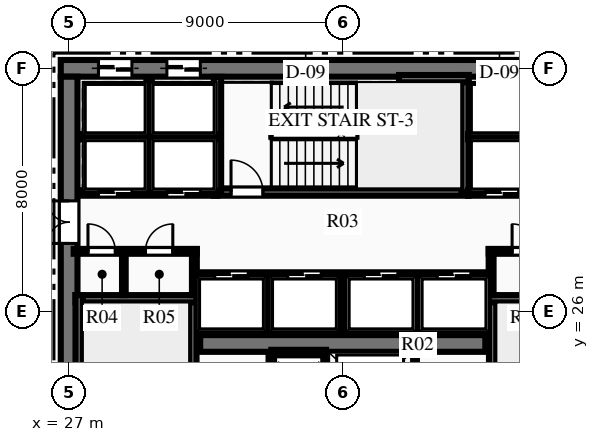
"""IFC4 building model, lengths in metres.
Left out: names, types, materials, properties, quantities, classifications, styles, units other than length and angle.
Written with IfcOpenShell. Run it as: python <this file> out.ifc"""

import sys

from ifc_helpers import new_model, si_unit, direction, frame, frame_2d, origin, place, context, subcontext, project, spatial, rectangle, extrude, element, fill, save


model = new_model("IFC4")
c1 = context("Model", 3, precision=1e-05, world=origin(), true_north=direction((0.0, 1.0)))
c2 = subcontext(c1, "Body", "Model", "MODEL_VIEW")
j1 = project(units=[si_unit("LENGTHUNIT", "METRE"), si_unit("PLANEANGLEUNIT", "RADIAN")], contexts=[c1])
p1 = place(None, origin())
s1 = spatial("IfcSite", under=j1, at=p1, CompositionType="ELEMENT")
p2 = place(p1, origin())
s2 = spatial("IfcBuilding", under=s1, at=p2, CompositionType="ELEMENT")
p3 = place(p2, frame((0.0, 0.0, 90.45)))
s3 = spatial("IfcBuildingStorey", under=s2, at=p3, CompositionType="ELEMENT", Elevation=90.45)
p4 = place(p3, frame((26.725, 34.0, 0.0), z_axis=(0.0, 0.0, 1.0), x_axis=(1.0, 0.0, 0.0)))
e1 = element("IfcWall", 1, at=p4, inside=s3, PredefinedType="SHEAR", context=c2, shape_type="SweptSolid", body=[
    extrude(rectangle(XDim=18.55, YDim=0.55, at=frame_2d((9.275, 0.0))), origin(), (0.0, 0.0, 1.0), 3.75),
])
p5 = place(p4, frame((1.24, 0.0, 0.0)))
e2 = element("IfcOpeningElement", 2, at=p5, cuts=e1, PredefinedType="OPENING", context=c2, shape_type="SweptSolid", body=[
    extrude(rectangle(XDim=1.1, YDim=2.15, at=frame_2d((0.55, 1.075))), frame((0.0, 0.285, 0.0), z_axis=(0.0, -1.0, 0.0), x_axis=(1.0, 0.0, 0.0)), (0.0, 0.0, 1.0), 0.57),
])
p6 = place(p4, frame((3.49, 0.0, 0.0)))
e3 = element("IfcOpeningElement", 3, at=p6, cuts=e1, PredefinedType="OPENING", context=c2, shape_type="SweptSolid", body=[
    extrude(rectangle(XDim=1.1, YDim=2.15, at=frame_2d((0.55, 1.075))), frame((0.0, 0.285, 0.0), z_axis=(0.0, -1.0, 0.0), x_axis=(1.0, 0.0, 0.0)), (0.0, 0.0, 1.0), 0.57),
])
p7 = place(p4, frame((13.96, 0.0, 0.0)))
e4 = element("IfcOpeningElement", 4, at=p7, cuts=e1, PredefinedType="OPENING", context=c2, shape_type="SweptSolid", body=[
    extrude(rectangle(XDim=1.1, YDim=2.15, at=frame_2d((0.55, 1.075))), frame((0.0, 0.285, 0.0), z_axis=(0.0, -1.0, 0.0), x_axis=(1.0, 0.0, 0.0)), (0.0, 0.0, 1.0), 0.57),
])
p8 = place(p4, frame((16.21, 0.0, 0.0)))
e5 = element("IfcOpeningElement", 5, at=p8, cuts=e1, PredefinedType="OPENING", context=c2, shape_type="SweptSolid", body=[
    extrude(rectangle(XDim=1.1, YDim=2.15, at=frame_2d((0.55, 1.075))), frame((0.0, 0.285, 0.0), z_axis=(0.0, -1.0, 0.0), x_axis=(1.0, 0.0, 0.0)), (0.0, 0.0, 1.0), 0.57),
])
p9 = place(p3, frame((27.0, 18.275, 0.0), z_axis=(0.0, 0.0, 1.0), x_axis=(0.0, 1.0, 0.0)))
e6 = element("IfcWall", 6, at=p9, inside=s3, PredefinedType="SHEAR", context=c2, shape_type="SweptSolid", body=[
    extrude(rectangle(XDim=15.45, YDim=0.55, at=frame_2d((7.725, 0.0))), origin(), (0.0, 0.0, 1.0), 3.75),
])
p10 = place(p9, frame((9.965, 0.0, 0.0)))
e7 = element("IfcOpeningElement", 7, at=p10, cuts=e6, PredefinedType="OPENING", context=c2, shape_type="SweptSolid", body=[
    extrude(rectangle(XDim=1.4, YDim=2.2, at=frame_2d((0.7, 1.1))), frame((0.0, 0.285, 0.0), z_axis=(0.0, -1.0, 0.0), x_axis=(1.0, 0.0, 0.0)), (0.0, 0.0, 1.0), 0.57),
])
p11 = place(p3, frame((31.31, 24.95, 0.0), z_axis=(0.0, 0.0, 1.0), x_axis=(1.0, 0.0, 0.0)))
e8 = element("IfcWall", 8, at=p11, inside=s3, PredefinedType="SHEAR", context=c2, shape_type="SweptSolid", body=[
    extrude(rectangle(XDim=9.38, YDim=0.55, at=frame_2d((4.69, 0.0))), origin(), (0.0, 0.0, 1.0), 3.75),
])
p12 = place(p3, frame((31.07, 18.28, 0.0), z_axis=(0.0, 0.0, 1.0), x_axis=(0.0, 1.0, 0.0)))
e9 = element("IfcWall", 9, at=p12, inside=s3, PredefinedType="SHEAR", context=c2, shape_type="SweptSolid", body=[
    extrude(rectangle(XDim=8.26, YDim=0.24, at=frame_2d((4.13, 0.0))), origin(), (0.0, 0.0, 1.0), 3.75),
])
p13 = place(p12, frame((0.365, 0.0, 0.0)))
e10 = element("IfcOpeningElement", 10, at=p13, cuts=e9, PredefinedType="OPENING", context=c2, shape_type="SweptSolid", body=[
    extrude(rectangle(XDim=1.05, YDim=2.15, at=frame_2d((0.525, 1.075))), frame((0.0, 0.13, 0.0), z_axis=(0.0, -1.0, 0.0), x_axis=(1.0, 0.0, 0.0)), (0.0, 0.0, 1.0), 0.26),
])
p14 = place(p3, frame((27.21, 26.42, 0.0), z_axis=(0.0, 0.0, 1.0), x_axis=(1.0, 0.0, 0.0)))
e11 = element("IfcWall", 11, at=p14, inside=s3, PredefinedType="SHEAR", context=c2, shape_type="SweptSolid", body=[
    extrude(rectangle(XDim=3.98, YDim=0.24, at=frame_2d((1.99, 0.0))), origin(), (0.0, 0.0, 1.0), 3.75),
])
p15 = place(p3, frame((27.33, 18.28, 0.0), z_axis=(0.0, 0.0, 1.0), x_axis=(0.0, 1.0, 0.0)))
e12 = element("IfcWall", 12, at=p15, inside=s3, PredefinedType="SHEAR", context=c2, shape_type="SweptSolid", body=[
    extrude(rectangle(XDim=8.26, YDim=0.24, at=frame_2d((4.13, 0.0))), origin(), (0.0, 0.0, 1.0), 3.75),
])
p16 = place(p3, frame((40.93, 18.28, 0.0), z_axis=(0.0, 0.0, 1.0), x_axis=(0.0, 1.0, 0.0)))
e13 = element("IfcWall", 13, at=p16, inside=s3, PredefinedType="SHEAR", context=c2, shape_type="SweptSolid", body=[
    extrude(rectangle(XDim=8.26, YDim=0.24, at=frame_2d((4.13, 0.0))), origin(), (0.0, 0.0, 1.0), 3.75),
])
p17 = place(p16, frame((0.365, 0.0, 0.0)))
e14 = element("IfcOpeningElement", 14, at=p17, cuts=e13, PredefinedType="OPENING", context=c2, shape_type="SweptSolid", body=[
    extrude(rectangle(XDim=1.05, YDim=2.15, at=frame_2d((0.525, 1.075))), frame((0.0, 0.13, 0.0), z_axis=(0.0, -1.0, 0.0), x_axis=(1.0, 0.0, 0.0)), (0.0, 0.0, 1.0), 0.26),
])
p18 = place(p3, frame((40.81, 26.42, 0.0), z_axis=(0.0, 0.0, 1.0), x_axis=(1.0, 0.0, 0.0)))
e15 = element("IfcWall", 15, at=p18, inside=s3, PredefinedType="SHEAR", context=c2, shape_type="SweptSolid", body=[
    extrude(rectangle(XDim=3.98, YDim=0.24, at=frame_2d((1.99, 0.0))), origin(), (0.0, 0.0, 1.0), 3.75),
])
p19 = place(p3, frame((31.76, 29.93, 0.0), z_axis=(0.0, 0.0, 1.0), x_axis=(1.0, 0.0, 0.0)))
e16 = element("IfcWall", 16, at=p19, inside=s3, PredefinedType="SHEAR", context=c2, shape_type="SweptSolid", body=[
    extrude(rectangle(XDim=8.38, YDim=0.24, at=frame_2d((4.19, 0.0))), origin(), (0.0, 0.0, 1.0), 3.75),
])
p20 = place(p19, frame((0.565, 0.0, 0.0)))
e17 = element("IfcOpeningElement", 17, at=p20, cuts=e16, PredefinedType="OPENING", context=c2, shape_type="SweptSolid", body=[
    extrude(rectangle(XDim=1.05, YDim=2.15, at=frame_2d((0.525, 1.075))), frame((0.0, 0.13, 0.0), z_axis=(0.0, -1.0, 0.0), x_axis=(1.0, 0.0, 0.0)), (0.0, 0.0, 1.0), 0.26),
])
p21 = place(p3, frame((31.88, 29.93, 0.0), z_axis=(0.0, 0.0, 1.0), x_axis=(0.0, 1.0, 0.0)))
e18 = element("IfcWall", 18, at=p21, inside=s3, PredefinedType="SHEAR", context=c2, shape_type="SweptSolid", body=[
    extrude(rectangle(XDim=3.79, YDim=0.24, at=frame_2d((1.895, 0.0))), origin(), (0.0, 0.0, 1.0), 3.75),
])
p22 = place(p3, frame((40.02, 29.93, 0.0), z_axis=(0.0, 0.0, 1.0), x_axis=(0.0, 1.0, 0.0)))
e19 = element("IfcWall", 19, at=p22, inside=s3, PredefinedType="SHEAR", context=c2, shape_type="SweptSolid", body=[
    extrude(rectangle(XDim=3.85, YDim=0.24, at=frame_2d((1.925, 0.0))), origin(), (0.0, 0.0, 1.0), 3.75),
])
p23 = place(p3, frame((37.85, 33.66, 0.0), z_axis=(0.0, 0.0, 1.0), x_axis=(1.0, 0.0, 0.0)))
e20 = element("IfcWall", 20, at=p23, inside=s3, PredefinedType="SHEAR", context=c2, shape_type="SweptSolid", body=[
    extrude(rectangle(XDim=2.29, YDim=0.24, at=frame_2d((1.145, 0.0))), origin(), (0.0, 0.0, 1.0), 3.75),
])
for number, where, z_axis, x_axis in (
    (21, (33.65, 22.05, 0.0), (0.0, 0.0, 1.0), (0.0, 1.0, 0.0)),
    (22, (35.45, 22.05, 0.0), (0.0, 0.0, 1.0), (0.0, 1.0, 0.0)),
):
    element("IfcWall", number, at=place(p3, frame(where, z_axis=z_axis, x_axis=x_axis)), inside=s3, PredefinedType="PARTITIONING", context=c2, shape_type="SweptSolid", body=[
        extrude(rectangle(XDim=2.6, YDim=0.18, at=frame_2d((1.3, 0.0))), origin(), (0.0, 0.0, 1.0), 3.45),
    ])
p24 = place(p3, frame((33.65, 24.65, 0.0), z_axis=(0.0, 0.0, 1.0), x_axis=(1.0, 0.0, 0.0)))
e23 = element("IfcWall", 23, at=p24, inside=s3, PredefinedType="PARTITIONING", context=c2, shape_type="SweptSolid", body=[
    extrude(rectangle(XDim=1.8, YDim=0.18, at=frame_2d((0.9, 0.0))), origin(), (0.0, 0.0, 1.0), 3.45),
])
p25 = place(p3, frame((38.35, 22.05, 0.0), z_axis=(0.0, 0.0, 1.0), x_axis=(0.0, 1.0, 0.0)))
e24 = element("IfcWall", 24, at=p25, inside=s3, PredefinedType="PARTITIONING", context=c2, shape_type="SweptSolid", body=[
    extrude(rectangle(XDim=2.6, YDim=0.18, at=frame_2d((1.3, 0.0))), origin(), (0.0, 0.0, 1.0), 3.45),
])
p26 = place(p3, frame((27.15, 27.98, 0.0), z_axis=(0.0, 0.0, 1.0), x_axis=(1.0, 0.0, 0.0)))
e25 = element("IfcWall", 25, at=p26, inside=s3, PredefinedType="PARTITIONING", context=c2, shape_type="SweptSolid", body=[
    extrude(rectangle(XDim=4.05, YDim=0.16, at=frame_2d((2.025, 0.0))), origin(), (0.0, 0.0, 1.0), 3.45),
])
p27 = place(p26, frame((0.47, 0.0, 0.0)))
e26 = element("IfcOpeningElement", 26, at=p27, cuts=e25, PredefinedType="OPENING", context=c2, shape_type="SweptSolid", body=[
    extrude(rectangle(XDim=0.9, YDim=2.15, at=frame_2d((0.45, 1.075))), frame((0.0, 0.09, 0.0), z_axis=(0.0, -1.0, 0.0), x_axis=(1.0, 0.0, 0.0)), (0.0, 0.0, 1.0), 0.18),
])
p28 = place(p26, frame((2.36, 0.0, 0.0)))
e27 = element("IfcOpeningElement", 27, at=p28, cuts=e25, PredefinedType="OPENING", context=c2, shape_type="SweptSolid", body=[
    extrude(rectangle(XDim=0.9, YDim=2.15, at=frame_2d((0.45, 1.075))), frame((0.0, 0.09, 0.0), z_axis=(0.0, -1.0, 0.0), x_axis=(1.0, 0.0, 0.0)), (0.0, 0.0, 1.0), 0.18),
])
p29 = place(p3, frame((31.12, 26.54, 0.0), z_axis=(0.0, 0.0, 1.0), x_axis=(0.0, 1.0, 0.0)))
e28 = element("IfcWall", 28, at=p29, inside=s3, PredefinedType="PARTITIONING", context=c2, shape_type="SweptSolid", body=[
    extrude(rectangle(XDim=1.51, YDim=0.16, at=frame_2d((0.755, 0.0))), origin(), (0.0, 0.0, 1.0), 3.45),
])
p30 = place(p3, frame((40.8, 27.98, 0.0), z_axis=(0.0, 0.0, 1.0), x_axis=(1.0, 0.0, 0.0)))
e29 = element("IfcWall", 29, at=p30, inside=s3, PredefinedType="PARTITIONING", context=c2, shape_type="SweptSolid", body=[
    extrude(rectangle(XDim=4.05, YDim=0.16, at=frame_2d((2.025, 0.0))), origin(), (0.0, 0.0, 1.0), 3.45),
])
p31 = place(p30, frame((0.77, 0.0, 0.0)))
e30 = element("IfcOpeningElement", 30, at=p31, cuts=e29, PredefinedType="OPENING", context=c2, shape_type="SweptSolid", body=[
    extrude(rectangle(XDim=0.9, YDim=2.15, at=frame_2d((0.45, 1.075))), frame((0.0, 0.09, 0.0), z_axis=(0.0, -1.0, 0.0), x_axis=(1.0, 0.0, 0.0)), (0.0, 0.0, 1.0), 0.18),
])
p32 = place(p30, frame((2.68, 0.0, 0.0)))
e31 = element("IfcOpeningElement", 31, at=p32, cuts=e29, PredefinedType="OPENING", context=c2, shape_type="SweptSolid", body=[
    extrude(rectangle(XDim=0.9, YDim=2.15, at=frame_2d((0.45, 1.075))), frame((0.0, 0.09, 0.0), z_axis=(0.0, -1.0, 0.0), x_axis=(1.0, 0.0, 0.0)), (0.0, 0.0, 1.0), 0.18),
])
p33 = place(p3, frame((40.88, 26.54, 0.0), z_axis=(0.0, 0.0, 1.0), x_axis=(0.0, 1.0, 0.0)))
e32 = element("IfcWall", 32, at=p33, inside=s3, PredefinedType="PARTITIONING", context=c2, shape_type="SweptSolid", body=[
    extrude(rectangle(XDim=1.51, YDim=0.16, at=frame_2d((0.755, 0.0))), origin(), (0.0, 0.0, 1.0), 3.45),
])
p34 = place(p3, frame((28.8, 26.54, 0.0), z_axis=(0.0, 0.0, 1.0), x_axis=(0.0, 1.0, 0.0)))
e33 = element("IfcWall", 33, at=p34, inside=s3, PredefinedType="PARTITIONING", context=c2, shape_type="SweptSolid", body=[
    extrude(rectangle(XDim=1.44, YDim=0.12, at=frame_2d((0.72, 0.0))), origin(), (0.0, 0.0, 1.0), 3.45),
])
p35 = place(p3, frame((27.45, 29.9, 0.0), z_axis=(0.0, 0.0, 1.0), x_axis=(1.0, 0.0, 0.0)))
e34 = element("IfcWall", 34, at=p35, inside=s3, PredefinedType="PARTITIONING", context=c2, shape_type="SweptSolid", body=[
    extrude(rectangle(XDim=4.43, YDim=0.18, at=frame_2d((2.215, 0.0))), origin(), (0.0, 0.0, 1.0), 3.45),
])
p36 = place(p35, frame((0.515, 0.0, 0.0)))
e35 = element("IfcOpeningElement", 35, at=p36, cuts=e34, PredefinedType="OPENING", context=c2, shape_type="SweptSolid", body=[
    extrude(rectangle(XDim=1.1, YDim=2.15, at=frame_2d((0.55, 1.075))), frame((0.0, 0.1, 0.0), z_axis=(0.0, -1.0, 0.0), x_axis=(1.0, 0.0, 0.0)), (0.0, 0.0, 1.0), 0.2),
])
p37 = place(p35, frame((2.765, 0.0, 0.0)))
e36 = element("IfcOpeningElement", 36, at=p37, cuts=e34, PredefinedType="OPENING", context=c2, shape_type="SweptSolid", body=[
    extrude(rectangle(XDim=1.1, YDim=2.15, at=frame_2d((0.55, 1.075))), frame((0.0, 0.1, 0.0), z_axis=(0.0, -1.0, 0.0), x_axis=(1.0, 0.0, 0.0)), (0.0, 0.0, 1.0), 0.2),
])
p38 = place(p3, frame((27.45, 31.75, 0.0), z_axis=(0.0, 0.0, 1.0), x_axis=(1.0, 0.0, 0.0)))
e37 = element("IfcWall", 37, at=p38, inside=s3, PredefinedType="PARTITIONING", context=c2, shape_type="SweptSolid", body=[
    extrude(rectangle(XDim=4.43, YDim=0.18, at=frame_2d((2.215, 0.0))), origin(), (0.0, 0.0, 1.0), 3.45),
])
p39 = place(p3, frame((29.63, 29.9, 0.0), z_axis=(0.0, 0.0, 1.0), x_axis=(0.0, 1.0, 0.0)))
e38 = element("IfcWall", 38, at=p39, inside=s3, PredefinedType="PARTITIONING", context=c2, shape_type="SweptSolid", body=[
    extrude(rectangle(XDim=3.75, YDim=0.18, at=frame_2d((1.875, 0.0))), origin(), (0.0, 0.0, 1.0), 3.45),
])
p40 = place(p3, frame((40.12, 29.9, 0.0), z_axis=(0.0, 0.0, 1.0), x_axis=(1.0, 0.0, 0.0)))
e39 = element("IfcWall", 39, at=p40, inside=s3, PredefinedType="PARTITIONING", context=c2, shape_type="SweptSolid", body=[
    extrude(rectangle(XDim=4.43, YDim=0.18, at=frame_2d((2.215, 0.0))), origin(), (0.0, 0.0, 1.0), 3.45),
])
p41 = place(p40, frame((0.565, 0.0, 0.0)))
e40 = element("IfcOpeningElement", 40, at=p41, cuts=e39, PredefinedType="OPENING", context=c2, shape_type="SweptSolid", body=[
    extrude(rectangle(XDim=1.1, YDim=2.15, at=frame_2d((0.55, 1.075))), frame((0.0, 0.1, 0.0), z_axis=(0.0, -1.0, 0.0), x_axis=(1.0, 0.0, 0.0)), (0.0, 0.0, 1.0), 0.2),
])
p42 = place(p40, frame((2.815, 0.0, 0.0)))
e41 = element("IfcOpeningElement", 41, at=p42, cuts=e39, PredefinedType="OPENING", context=c2, shape_type="SweptSolid", body=[
    extrude(rectangle(XDim=1.1, YDim=2.15, at=frame_2d((0.55, 1.075))), frame((0.0, 0.1, 0.0), z_axis=(0.0, -1.0, 0.0), x_axis=(1.0, 0.0, 0.0)), (0.0, 0.0, 1.0), 0.2),
])
p43 = place(p3, frame((40.12, 31.75, 0.0), z_axis=(0.0, 0.0, 1.0), x_axis=(1.0, 0.0, 0.0)))
e42 = element("IfcWall", 42, at=p43, inside=s3, PredefinedType="PARTITIONING", context=c2, shape_type="SweptSolid", body=[
    extrude(rectangle(XDim=4.43, YDim=0.18, at=frame_2d((2.215, 0.0))), origin(), (0.0, 0.0, 1.0), 3.45),
])
p44 = place(p3, frame((31.2, 27.2, 0.0), z_axis=(0.0, 0.0, 1.0), x_axis=(1.0, 0.0, 0.0)))
e43 = element("IfcWall", 43, at=p44, inside=s3, PredefinedType="PARTITIONING", context=c2, shape_type="SweptSolid", body=[
    extrude(rectangle(XDim=9.6, YDim=0.18, at=frame_2d((4.8, 0.0))), origin(), (0.0, 0.0, 1.0), 3.45),
])
p45 = place(p44, frame((0.59, 0.0, 0.0)))
e44 = element("IfcOpeningElement", 44, at=p45, cuts=e43, PredefinedType="OPENING", context=c2, shape_type="SweptSolid", body=[
    extrude(rectangle(XDim=1.1, YDim=2.15, at=frame_2d((0.55, 1.075))), frame((0.0, 0.1, 0.0), z_axis=(0.0, -1.0, 0.0), x_axis=(1.0, 0.0, 0.0)), (0.0, 0.0, 1.0), 0.2),
])
p46 = place(p44, frame((2.99, 0.0, 0.0)))
e45 = element("IfcOpeningElement", 45, at=p46, cuts=e43, PredefinedType="OPENING", context=c2, shape_type="SweptSolid", body=[
    extrude(rectangle(XDim=1.1, YDim=2.15, at=frame_2d((0.55, 1.075))), frame((0.0, 0.1, 0.0), z_axis=(0.0, -1.0, 0.0), x_axis=(1.0, 0.0, 0.0)), (0.0, 0.0, 1.0), 0.2),
])
p47 = place(p44, frame((5.51, 0.0, 0.0)))
e46 = element("IfcOpeningElement", 46, at=p47, cuts=e43, PredefinedType="OPENING", context=c2, shape_type="SweptSolid", body=[
    extrude(rectangle(XDim=1.1, YDim=2.15, at=frame_2d((0.55, 1.075))), frame((0.0, 0.1, 0.0), z_axis=(0.0, -1.0, 0.0), x_axis=(1.0, 0.0, 0.0)), (0.0, 0.0, 1.0), 0.2),
])
p48 = place(p44, frame((7.91, 0.0, 0.0)))
e47 = element("IfcOpeningElement", 47, at=p48, cuts=e43, PredefinedType="OPENING", context=c2, shape_type="SweptSolid", body=[
    extrude(rectangle(XDim=1.1, YDim=2.15, at=frame_2d((0.55, 1.075))), frame((0.0, 0.1, 0.0), z_axis=(0.0, -1.0, 0.0), x_axis=(1.0, 0.0, 0.0)), (0.0, 0.0, 1.0), 0.2),
])
for number, where, z_axis, x_axis in (
    (48, (33.54, 25.3, 0.0), (0.0, 0.0, 1.0), (0.0, 1.0, 0.0)),
    (49, (36.0, 25.3, 0.0), (0.0, 0.0, 1.0), (0.0, 1.0, 0.0)),
    (50, (38.46, 25.3, 0.0), (0.0, 0.0, 1.0), (0.0, 1.0, 0.0)),
):
    element("IfcWall", number, at=place(p3, frame(where, z_axis=z_axis, x_axis=x_axis)), inside=s3, PredefinedType="PARTITIONING", context=c2, shape_type="SweptSolid", body=[
        extrude(rectangle(XDim=1.9, YDim=0.18, at=frame_2d((0.95, 0.0))), origin(), (0.0, 0.0, 1.0), 3.45),
    ])
p49 = place(p27, origin())
e51 = element("IfcDoor", 51, at=p49, inside=s3, OperationType="SINGLE_SWING_LEFT", PredefinedType="DOOR", context=c2, shape_type="SweptSolid", body=[
    extrude(rectangle(XDim=0.9, YDim=2.15, at=frame_2d((0.45, 1.075))), frame((0.0, 0.025, 0.0), z_axis=(0.0, -1.0, 0.0), x_axis=(1.0, 0.0, 0.0)), (0.0, 0.0, 1.0), 0.05),
])
fill(e26, e51)
p50 = place(p28, origin())
e52 = element("IfcDoor", 52, at=p50, inside=s3, OperationType="SINGLE_SWING_RIGHT", PredefinedType="DOOR", context=c2, shape_type="SweptSolid", body=[
    extrude(rectangle(XDim=0.9, YDim=2.15, at=frame_2d((0.45, 1.075))), frame((0.0, 0.025, 0.0), z_axis=(0.0, -1.0, 0.0), x_axis=(1.0, 0.0, 0.0)), (0.0, 0.0, 1.0), 0.05),
])
fill(e27, e52)
p51 = place(p31, origin())
e53 = element("IfcDoor", 53, at=p51, inside=s3, OperationType="SINGLE_SWING_LEFT", PredefinedType="DOOR", context=c2, shape_type="SweptSolid", body=[
    extrude(rectangle(XDim=0.9, YDim=2.15, at=frame_2d((0.45, 1.075))), frame((0.0, 0.025, 0.0), z_axis=(0.0, -1.0, 0.0), x_axis=(1.0, 0.0, 0.0)), (0.0, 0.0, 1.0), 0.05),
])
fill(e30, e53)
p52 = place(p20, origin())
e54 = element("IfcDoor", 54, at=p52, inside=s3, OperationType="SINGLE_SWING_LEFT", PredefinedType="DOOR", context=c2, shape_type="SweptSolid", body=[
    extrude(rectangle(XDim=1.05, YDim=2.15, at=frame_2d((0.525, 1.075))), frame((0.0, 0.025, 0.0), z_axis=(0.0, -1.0, 0.0), x_axis=(1.0, 0.0, 0.0)), (0.0, 0.0, 1.0), 0.05),
])
fill(e17, e54)
p53 = place(p10, origin())
e55 = element("IfcDoor", 55, at=p53, inside=s3, OperationType="DOUBLE_DOOR_SINGLE_SWING", PredefinedType="DOOR", context=c2, shape_type="SweptSolid", body=[
    extrude(rectangle(XDim=1.4, YDim=2.2, at=frame_2d((0.7, 1.1))), frame((0.0, 0.025, 0.0), z_axis=(0.0, -1.0, 0.0), x_axis=(1.0, 0.0, 0.0)), (0.0, 0.0, 1.0), 0.05),
])
fill(e7, e55)
p54 = place(p36, origin())
e56 = element("IfcDoor", 56, at=p54, inside=s3, OperationType="SLIDING_TO_LEFT", PredefinedType="DOOR", context=c2, shape_type="SweptSolid", body=[
    extrude(rectangle(XDim=1.1, YDim=2.15, at=frame_2d((0.55, 1.075))), frame((0.0, 0.025, 0.0), z_axis=(0.0, -1.0, 0.0), x_axis=(1.0, 0.0, 0.0)), (0.0, 0.0, 1.0), 0.05),
])
fill(e35, e56)
p55 = place(p37, origin())
e57 = element("IfcDoor", 57, at=p55, inside=s3, OperationType="SLIDING_TO_LEFT", PredefinedType="DOOR", context=c2, shape_type="SweptSolid", body=[
    extrude(rectangle(XDim=1.1, YDim=2.15, at=frame_2d((0.55, 1.075))), frame((0.0, 0.025, 0.0), z_axis=(0.0, -1.0, 0.0), x_axis=(1.0, 0.0, 0.0)), (0.0, 0.0, 1.0), 0.05),
])
fill(e36, e57)
p56 = place(p5, origin())
e58 = element("IfcDoor", 58, at=p56, inside=s3, OperationType="SLIDING_TO_LEFT", PredefinedType="DOOR", context=c2, shape_type="SweptSolid", body=[
    extrude(rectangle(XDim=1.1, YDim=2.15, at=frame_2d((0.55, 1.075))), frame((0.0, 0.025, 0.0), z_axis=(0.0, -1.0, 0.0), x_axis=(1.0, 0.0, 0.0)), (0.0, 0.0, 1.0), 0.05),
])
fill(e2, e58)
p57 = place(p6, origin())
e59 = element("IfcDoor", 59, at=p57, inside=s3, OperationType="SLIDING_TO_LEFT", PredefinedType="DOOR", context=c2, shape_type="SweptSolid", body=[
    extrude(rectangle(XDim=1.1, YDim=2.15, at=frame_2d((0.55, 1.075))), frame((0.0, 0.025, 0.0), z_axis=(0.0, -1.0, 0.0), x_axis=(1.0, 0.0, 0.0)), (0.0, 0.0, 1.0), 0.05),
])
fill(e3, e59)
p58 = place(p41, origin())
e60 = element("IfcDoor", 60, at=p58, inside=s3, OperationType="SLIDING_TO_LEFT", PredefinedType="DOOR", context=c2, shape_type="SweptSolid", body=[
    extrude(rectangle(XDim=1.1, YDim=2.15, at=frame_2d((0.55, 1.075))), frame((0.0, 0.025, 0.0), z_axis=(0.0, -1.0, 0.0), x_axis=(1.0, 0.0, 0.0)), (0.0, 0.0, 1.0), 0.05),
])
fill(e40, e60)
p59 = place(p7, origin())
e61 = element("IfcDoor", 61, at=p59, inside=s3, OperationType="SLIDING_TO_LEFT", PredefinedType="DOOR", context=c2, shape_type="SweptSolid", body=[
    extrude(rectangle(XDim=1.1, YDim=2.15, at=frame_2d((0.55, 1.075))), frame((0.0, 0.025, 0.0), z_axis=(0.0, -1.0, 0.0), x_axis=(1.0, 0.0, 0.0)), (0.0, 0.0, 1.0), 0.05),
])
fill(e4, e61)
p60 = place(p45, origin())
e62 = element("IfcDoor", 62, at=p60, inside=s3, OperationType="SLIDING_TO_LEFT", PredefinedType="DOOR", context=c2, shape_type="SweptSolid", body=[
    extrude(rectangle(XDim=1.1, YDim=2.15, at=frame_2d((0.55, 1.075))), frame((0.0, 0.025, 0.0), z_axis=(0.0, -1.0, 0.0), x_axis=(1.0, 0.0, 0.0)), (0.0, 0.0, 1.0), 0.05),
])
fill(e44, e62)
p61 = place(p46, origin())
e63 = element("IfcDoor", 63, at=p61, inside=s3, OperationType="SLIDING_TO_LEFT", PredefinedType="DOOR", context=c2, shape_type="SweptSolid", body=[
    extrude(rectangle(XDim=1.1, YDim=2.15, at=frame_2d((0.55, 1.075))), frame((0.0, 0.025, 0.0), z_axis=(0.0, -1.0, 0.0), x_axis=(1.0, 0.0, 0.0)), (0.0, 0.0, 1.0), 0.05),
])
fill(e45, e63)
p62 = place(p47, origin())
e64 = element("IfcDoor", 64, at=p62, inside=s3, OperationType="SLIDING_TO_LEFT", PredefinedType="DOOR", context=c2, shape_type="SweptSolid", body=[
    extrude(rectangle(XDim=1.1, YDim=2.15, at=frame_2d((0.55, 1.075))), frame((0.0, 0.025, 0.0), z_axis=(0.0, -1.0, 0.0), x_axis=(1.0, 0.0, 0.0)), (0.0, 0.0, 1.0), 0.05),
])
fill(e46, e64)
p63 = place(p48, origin())
e65 = element("IfcDoor", 65, at=p63, inside=s3, OperationType="SLIDING_TO_LEFT", PredefinedType="DOOR", context=c2, shape_type="SweptSolid", body=[
    extrude(rectangle(XDim=1.1, YDim=2.15, at=frame_2d((0.55, 1.075))), frame((0.0, 0.025, 0.0), z_axis=(0.0, -1.0, 0.0), x_axis=(1.0, 0.0, 0.0)), (0.0, 0.0, 1.0), 0.05),
])
fill(e47, e65)
save(model, sys.argv[1])
